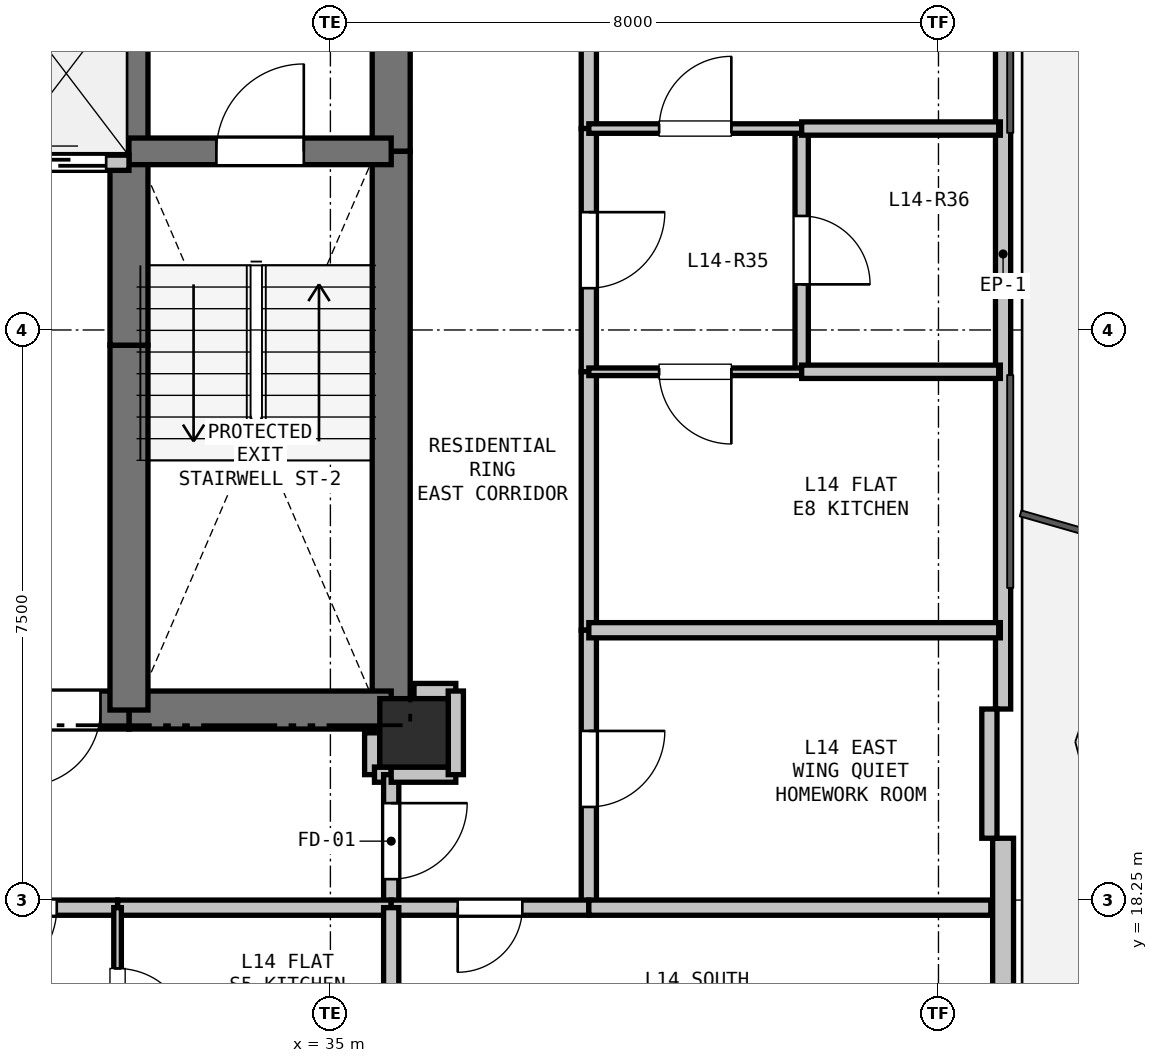
"""IFC4 building model, lengths in metres.
Left out: names, types, materials, properties, quantities, classifications, styles, units other than length and angle.
Written with IfcOpenShell. Run it as: python <this file> out.ifc"""

import sys

from ifc_helpers import new_model, si_unit, direction, frame, frame_2d, origin, origin_2d, place, context, subcontext, project, spatial, rectangle, extrude, element, fill, save


model = new_model("IFC4")
c1 = context("Model", 3, precision=1e-05, world=origin(), true_north=direction((0.0, 1.0)))
c2 = subcontext(c1, "Body", "Model", "MODEL_VIEW")
j1 = project(units=[si_unit("LENGTHUNIT", "METRE"), si_unit("PLANEANGLEUNIT", "RADIAN")], contexts=[c1])
p1 = place(None, origin())
s1 = spatial("IfcSite", under=j1, at=p1, CompositionType="ELEMENT")
p2 = place(p1, origin())
s2 = spatial("IfcBuilding", under=s1, at=p2, CompositionType="ELEMENT")
p3 = place(p2, frame((0.0, 0.0, 52.2)))
s3 = spatial("IfcBuildingStorey", under=s2, at=p3, CompositionType="ELEMENT", Elevation=52.2)
p4 = place(p3, frame((36.1, 20.45, 0.0), z_axis=(0.0, 0.0, 1.0), x_axis=(1.0, 0.0, 0.0)))
e1 = element("IfcColumn", 1, at=p4, inside=s3, PredefinedType="COLUMN", context=c2, shape_type="SweptSolid", body=[
    extrude(rectangle(XDim=0.9, YDim=0.9, at=origin_2d()), origin(), (0.0, 0.0, 1.0), 3.3),
])
p5 = place(p3, frame((43.85, 32.737, 0.0), z_axis=(0.0, 0.0, 1.0), x_axis=(0.0, -1.0, 0.0)))
e2 = element("IfcWall", 2, at=p5, inside=s3, PredefinedType="PARAPET", context=c2, shape_type="SweptSolid", body=[
    extrude(rectangle(XDim=11.973, YDim=0.2, at=frame_2d((5.987, 0.0))), origin(), (0.0, 0.0, 1.0), 0.2),
])
p6 = place(p3, frame((43.85, 19.063, 0.0), z_axis=(0.0, 0.0, 1.0), x_axis=(0.0, -1.0, 0.0)))
e3 = element("IfcWall", 3, at=p6, inside=s3, PredefinedType="SOLIDWALL", context=c2, shape_type="SweptSolid", body=[
    extrude(rectangle(XDim=12.673, YDim=0.275, at=frame_2d((6.336, 0.0))), origin(), (0.0, 0.0, 1.0), 2.66),
])
p7 = place(p3, frame((43.67, 20.763, 0.0), z_axis=(0.0, 0.0, 1.0), x_axis=(0.0, -1.0, 0.0)))
e4 = element("IfcWall", 4, at=p7, inside=s3, PredefinedType="PARAPET", context=c2, shape_type="SweptSolid", body=[
    extrude(rectangle(XDim=1.7, YDim=0.2, at=frame_2d((0.85, 0.0))), origin(), (0.0, 0.0, 1.0), 2.66),
])
p8 = place(p3, frame((35.8, 32.75, 0.0), z_axis=(0.0, 0.0, 1.0), x_axis=(0.0, -1.0, 0.0)))
e5 = element("IfcWall", 5, at=p8, inside=s3, PredefinedType="SHEAR", context=c2, shape_type="SweptSolid", body=[
    extrude(rectangle(XDim=4.65, YDim=0.5, at=frame_2d((2.325, 0.0))), origin(), (0.0, 0.0, 1.0), 3.04),
])
p9 = place(p3, frame((35.8, 28.1, 0.0), z_axis=(0.0, 0.0, 1.0), x_axis=(0.0, -1.0, 0.0)))
e6 = element("IfcWall", 6, at=p9, inside=s3, PredefinedType="SHEAR", context=c2, shape_type="SweptSolid", body=[
    extrude(rectangle(XDim=7.35, YDim=0.5, at=frame_2d((3.675, 0.0))), origin(), (0.0, 0.0, 1.0), 3.04),
])
p10 = place(p3, frame((35.8, 20.75, 0.0), z_axis=(0.0, 0.0, 1.0), x_axis=(-1.0, 0.0, 0.0)))
e7 = element("IfcWall", 7, at=p10, inside=s3, PredefinedType="SHEAR", context=c2, shape_type="SweptSolid", body=[
    extrude(rectangle(XDim=3.45, YDim=0.5, at=frame_2d((1.725, 0.0))), origin(), (0.0, 0.0, 1.0), 3.04),
])
p11 = place(p3, frame((32.35, 20.75, 0.0), z_axis=(0.0, 0.0, 1.0), x_axis=(-1.0, 0.0, 0.0)))
e8 = element("IfcWall", 8, at=p11, inside=s3, PredefinedType="SHEAR", context=c2, shape_type="SweptSolid", body=[
    extrude(rectangle(XDim=1.75, YDim=0.5, at=frame_2d((0.875, 0.0))), origin(), (0.0, 0.0, 1.0), 3.04),
])
p12 = place(p11, frame((0.375, 0.0, 0.0)))
e9 = element("IfcOpeningElement", 9, at=p12, cuts=e8, PredefinedType="OPENING", context=c2, shape_type="SweptSolid", body=[
    extrude(rectangle(XDim=1.0, YDim=2.15, at=frame_2d((0.5, 1.075))), frame((0.0, 0.26, 0.0), z_axis=(0.0, -1.0, 0.0), x_axis=(1.0, 0.0, 0.0)), (0.0, 0.0, 1.0), 0.52),
])
p13 = place(p3, frame((32.35, 20.75, 0.0), z_axis=(0.0, 0.0, 1.0), x_axis=(0.0, 1.0, 0.0)))
e10 = element("IfcWall", 10, at=p13, inside=s3, PredefinedType="SHEAR", context=c2, shape_type="SweptSolid", body=[
    extrude(rectangle(XDim=4.8, YDim=0.5, at=frame_2d((2.4, 0.0))), origin(), (0.0, 0.0, 1.0), 3.04),
])
p14 = place(p3, frame((32.35, 25.55, 0.0), z_axis=(0.0, 0.0, 1.0), x_axis=(0.0, 1.0, 0.0)))
e11 = element("IfcWall", 11, at=p14, inside=s3, PredefinedType="SHEAR", context=c2, shape_type="SweptSolid", body=[
    extrude(rectangle(XDim=2.4, YDim=0.5, at=frame_2d((1.2, 0.0))), origin(), (0.0, 0.0, 1.0), 3.04),
])
p15 = place(p3, frame((32.35, 27.95, 0.0), z_axis=(0.0, 0.0, 1.0), x_axis=(0.0, 1.0, 0.0)))
e12 = element("IfcWall", 12, at=p15, inside=s3, PredefinedType="SHEAR", context=c2, shape_type="SweptSolid", body=[
    extrude(rectangle(XDim=2.8, YDim=0.5, at=frame_2d((1.4, 0.0))), origin(), (0.0, 0.0, 1.0), 3.04),
])
p16 = place(p3, frame((32.35, 28.1, 0.0), z_axis=(0.0, 0.0, 1.0), x_axis=(1.0, 0.0, 0.0)))
e13 = element("IfcWall", 13, at=p16, inside=s3, PredefinedType="SHEAR", context=c2, shape_type="SweptSolid", body=[
    extrude(rectangle(XDim=3.45, YDim=0.35, at=frame_2d((1.725, 0.0))), origin(), (0.0, 0.0, 1.0), 3.04),
])
p17 = place(p16, frame((1.15, 0.0, 0.0)))
e14 = element("IfcOpeningElement", 14, at=p17, cuts=e13, PredefinedType="OPENING", context=c2, shape_type="SweptSolid", body=[
    extrude(rectangle(XDim=1.15, YDim=2.15, at=frame_2d((0.575, 1.075))), frame((0.0, 0.185, 0.0), z_axis=(0.0, -1.0, 0.0), x_axis=(1.0, 0.0, 0.0)), (0.0, 0.0, 1.0), 0.37),
])
p18 = place(p3, frame((27.4, 27.95, 0.0), z_axis=(0.0, 0.0, 1.0), x_axis=(1.0, 0.0, 0.0)))
e15 = element("IfcWall", 15, at=p18, inside=s3, PredefinedType="PARTITIONING", context=c2, shape_type="SweptSolid", body=[
    extrude(rectangle(XDim=4.95, YDim=0.2, at=frame_2d((2.475, 0.0))), origin(), (0.0, 0.0, 1.0), 3.04),
])
p19 = place(p18, frame((0.25, 0.0, 0.0)))
e16 = element("IfcOpeningElement", 16, at=p19, cuts=e15, PredefinedType="OPENING", context=c2, shape_type="SweptSolid", body=[
    extrude(rectangle(XDim=1.1, YDim=2.15, at=frame_2d((0.55, 1.075))), frame((0.0, 0.11, 0.0), z_axis=(0.0, -1.0, 0.0), x_axis=(1.0, 0.0, 0.0)), (0.0, 0.0, 1.0), 0.22),
])
p20 = place(p18, frame((1.9, 0.0, 0.0)))
e17 = element("IfcOpeningElement", 17, at=p20, cuts=e15, PredefinedType="OPENING", context=c2, shape_type="SweptSolid", body=[
    extrude(rectangle(XDim=1.1, YDim=2.15, at=frame_2d((0.55, 1.075))), frame((0.0, 0.11, 0.0), z_axis=(0.0, -1.0, 0.0), x_axis=(1.0, 0.0, 0.0)), (0.0, 0.0, 1.0), 0.22),
])
p21 = place(p18, frame((3.55, 0.0, 0.0)))
e18 = element("IfcOpeningElement", 18, at=p21, cuts=e15, PredefinedType="OPENING", context=c2, shape_type="SweptSolid", body=[
    extrude(rectangle(XDim=1.1, YDim=2.15, at=frame_2d((0.55, 1.075))), frame((0.0, 0.11, 0.0), z_axis=(0.0, -1.0, 0.0), x_axis=(1.0, 0.0, 0.0)), (0.0, 0.0, 1.0), 0.22),
])
p22 = place(p3, frame((35.55, 20.45, 0.0), z_axis=(0.0, 0.0, 1.0), x_axis=(0.0, -1.0, 0.0)))
e19 = element("IfcWall", 19, at=p22, inside=s3, PredefinedType="PARTITIONING", context=c2, shape_type="SweptSolid", body=[
    extrude(rectangle(XDim=0.55, YDim=0.2, at=frame_2d((0.275, 0.0))), origin(), (0.0, 0.0, 1.0), 2.488),
])
p23 = place(p3, frame((35.58, 19.9, 0.0), z_axis=(0.0, 0.0, 1.0), x_axis=(1.0, 0.0, 0.0)))
e20 = element("IfcWall", 20, at=p23, inside=s3, PredefinedType="PARTITIONING", context=c2, shape_type="SweptSolid", body=[
    extrude(rectangle(XDim=0.22, YDim=0.2, at=frame_2d((0.11, 0.0))), origin(), (0.0, 0.0, 1.0), 3.04),
])
p24 = place(p3, frame((35.8, 19.9, 0.0), z_axis=(0.0, 0.0, 1.0), x_axis=(0.0, -1.0, 0.0)))
e21 = element("IfcWall", 21, at=p24, inside=s3, PredefinedType="PARTITIONING", context=c2, shape_type="SweptSolid", body=[
    extrude(rectangle(XDim=1.75, YDim=0.2, at=frame_2d((0.875, 0.0))), origin(), (0.0, 0.0, 1.0), 3.04),
])
p25 = place(p24, frame((0.375, 0.0, 0.0)))
e22 = element("IfcOpeningElement", 22, at=p25, cuts=e21, PredefinedType="OPENING", context=c2, shape_type="SweptSolid", body=[
    extrude(rectangle(XDim=1.0, YDim=2.15, at=frame_2d((0.5, 1.075))), frame((0.0, 0.11, 0.0), z_axis=(0.0, -1.0, 0.0), x_axis=(1.0, 0.0, 0.0)), (0.0, 0.0, 1.0), 0.22),
])
p26 = place(p3, frame((35.8, 18.15, 0.0), z_axis=(0.0, 0.0, 1.0), x_axis=(-1.0, 0.0, 0.0)))
e23 = element("IfcWall", 23, at=p26, inside=s3, PredefinedType="PARTITIONING", context=c2, shape_type="SweptSolid", body=[
    extrude(rectangle(XDim=3.6, YDim=0.2, at=frame_2d((1.8, 0.0))), origin(), (0.0, 0.0, 1.0), 3.04),
])
p27 = place(p3, frame((32.2, 18.15, 0.0), z_axis=(0.0, 0.0, 1.0), x_axis=(-1.0, 0.0, 0.0)))
e24 = element("IfcWall", 24, at=p27, inside=s3, PredefinedType="PARTITIONING", context=c2, shape_type="SweptSolid", body=[
    extrude(rectangle(XDim=2.6, YDim=0.2, at=frame_2d((1.3, 0.0))), origin(), (0.0, 0.0, 1.0), 3.04),
])
p28 = place(p27, frame((0.8, 0.0, 0.0)))
e25 = element("IfcOpeningElement", 25, at=p28, cuts=e24, PredefinedType="OPENING", context=c2, shape_type="SweptSolid", body=[
    extrude(rectangle(XDim=1.0, YDim=2.15, at=frame_2d((0.5, 1.075))), frame((0.0, 0.11, 0.0), z_axis=(0.0, -1.0, 0.0), x_axis=(1.0, 0.0, 0.0)), (0.0, 0.0, 1.0), 0.22),
])
p29 = place(p3, frame((36.65, 21.0, 0.0), z_axis=(0.0, 0.0, 1.0), x_axis=(-1.0, 0.0, 0.0)))
e26 = element("IfcWall", 26, at=p29, inside=s3, PredefinedType="PARTITIONING", context=c2, shape_type="SweptSolid", body=[
    extrude(rectangle(XDim=0.55, YDim=0.2, at=frame_2d((0.275, 0.0))), origin(), (0.0, 0.0, 1.0), 2.488),
])
p30 = place(p3, frame((38.4, 35.35, 0.0), z_axis=(0.0, 0.0, 1.0), x_axis=(0.0, -1.0, 0.0)))
e27 = element("IfcWall", 27, at=p30, inside=s3, PredefinedType="PARTITIONING", context=c2, shape_type="SweptSolid", body=[
    extrude(rectangle(XDim=6.95, YDim=0.2, at=frame_2d((3.475, 0.0))), origin(), (0.0, 0.0, 1.0), 2.338),
])
p31 = place(p3, frame((38.4, 28.4, 0.0), z_axis=(0.0, 0.0, 1.0), x_axis=(0.0, -1.0, 0.0)))
e28 = element("IfcWall", 28, at=p31, inside=s3, PredefinedType="PARTITIONING", context=c2, shape_type="SweptSolid", body=[
    extrude(rectangle(XDim=3.2, YDim=0.2, at=frame_2d((1.6, 0.0))), origin(), (0.0, 0.0, 1.0), 3.04),
])
p32 = place(p31, frame((1.1, 0.0, 0.0)))
e29 = element("IfcOpeningElement", 29, at=p32, cuts=e28, PredefinedType="OPENING", context=c2, shape_type="SweptSolid", body=[
    extrude(rectangle(XDim=1.0, YDim=2.15, at=frame_2d((0.5, 1.075))), frame((0.0, 0.11, 0.0), z_axis=(0.0, -1.0, 0.0), x_axis=(1.0, 0.0, 0.0)), (0.0, 0.0, 1.0), 0.22),
])
p33 = place(p3, frame((38.4, 25.2, 0.0), z_axis=(0.0, 0.0, 1.0), x_axis=(0.0, -1.0, 0.0)))
e30 = element("IfcWall", 30, at=p33, inside=s3, PredefinedType="PARTITIONING", context=c2, shape_type="SweptSolid", body=[
    extrude(rectangle(XDim=3.4, YDim=0.2, at=frame_2d((1.7, 0.0))), origin(), (0.0, 0.0, 1.0), 3.04),
])
p34 = place(p3, frame((38.4, 21.8, 0.0), z_axis=(0.0, 0.0, 1.0), x_axis=(0.0, -1.0, 0.0)))
e31 = element("IfcWall", 31, at=p34, inside=s3, PredefinedType="PARTITIONING", context=c2, shape_type="SweptSolid", body=[
    extrude(rectangle(XDim=3.65, YDim=0.2, at=frame_2d((1.825, 0.0))), origin(), (0.0, 0.0, 1.0), 3.04),
])
p35 = place(p34, frame((1.325, 0.0, 0.0)))
e32 = element("IfcOpeningElement", 32, at=p35, cuts=e31, PredefinedType="OPENING", context=c2, shape_type="SweptSolid", body=[
    extrude(rectangle(XDim=1.0, YDim=2.15, at=frame_2d((0.5, 1.075))), frame((0.0, 0.11, 0.0), z_axis=(0.0, -1.0, 0.0), x_axis=(1.0, 0.0, 0.0)), (0.0, 0.0, 1.0), 0.22),
])
p36 = place(p3, frame((38.4, 18.15, 0.0), z_axis=(0.0, 0.0, 1.0), x_axis=(-1.0, 0.0, 0.0)))
e33 = element("IfcWall", 33, at=p36, inside=s3, PredefinedType="PARTITIONING", context=c2, shape_type="SweptSolid", body=[
    extrude(rectangle(XDim=2.6, YDim=0.2, at=frame_2d((1.3, 0.0))), origin(), (0.0, 0.0, 1.0), 2.338),
])
p37 = place(p36, frame((0.875, 0.0, 0.0)))
e34 = element("IfcOpeningElement", 34, at=p37, cuts=e33, PredefinedType="OPENING", context=c2, shape_type="SweptSolid", body=[
    extrude(rectangle(XDim=0.85, YDim=2.1, at=frame_2d((0.425, 1.05))), frame((0.0, 0.11, 0.0), z_axis=(0.0, -1.0, 0.0), x_axis=(1.0, 0.0, 0.0)), (0.0, 0.0, 1.0), 0.22),
])
p38 = place(p3, frame((35.8, 19.9, 0.0), z_axis=(0.0, 0.0, 1.0), x_axis=(1.0, 0.0, 0.0)))
e35 = element("IfcWall", 35, at=p38, inside=s3, PredefinedType="PARTITIONING", context=c2, shape_type="SweptSolid", body=[
    extrude(rectangle(XDim=0.85, YDim=0.2, at=frame_2d((0.425, 0.0))), origin(), (0.0, 0.0, 1.0), 2.338),
])
p39 = place(p3, frame((36.65, 19.9, 0.0), z_axis=(0.0, 0.0, 1.0), x_axis=(0.0, 1.0, 0.0)))
e36 = element("IfcWall", 36, at=p39, inside=s3, PredefinedType="PARTITIONING", context=c2, shape_type="SweptSolid", body=[
    extrude(rectangle(XDim=1.1, YDim=0.2, at=frame_2d((0.55, 0.0))), origin(), (0.0, 0.0, 1.0), 3.04),
])
p40 = place(p3, frame((32.2, 18.15, 0.0), z_axis=(0.0, 0.0, 1.0), x_axis=(0.0, -1.0, 0.0)))
e37 = element("IfcWall", 37, at=p40, inside=s3, PredefinedType="PARTITIONING", context=c2, shape_type="SweptSolid", body=[
    extrude(rectangle(XDim=2.55, YDim=0.1, at=frame_2d((1.275, 0.0))), origin(), (0.0, 0.0, 1.0), 3.04),
])
p41 = place(p40, frame((0.8, 0.0, 0.0)))
e38 = element("IfcOpeningElement", 38, at=p41, cuts=e37, PredefinedType="OPENING", context=c2, shape_type="SweptSolid", body=[
    extrude(rectangle(XDim=0.95, YDim=2.1, at=frame_2d((0.475, 1.05))), frame((0.0, 0.06, 0.0), z_axis=(0.0, -1.0, 0.0), x_axis=(1.0, 0.0, 0.0)), (0.0, 0.0, 1.0), 0.12),
])
p42 = place(p3, frame((41.2, 28.4, 0.0), z_axis=(0.0, 0.0, 1.0), x_axis=(0.0, -1.0, 0.0)))
e39 = element("IfcWall", 39, at=p42, inside=s3, PredefinedType="PLUMBINGWALL", context=c2, shape_type="SweptSolid", body=[
    extrude(rectangle(XDim=3.2, YDim=0.175, at=frame_2d((1.6, 0.0))), origin(), (0.0, 0.0, 1.0), 3.04),
])
p43 = place(p42, frame((1.15, 0.0, 0.0)))
e40 = element("IfcOpeningElement", 40, at=p43, cuts=e39, PredefinedType="OPENING", context=c2, shape_type="SweptSolid", body=[
    extrude(rectangle(XDim=0.9, YDim=2.1, at=frame_2d((0.45, 1.05))), frame((0.0, 0.097, 0.0), z_axis=(0.0, -1.0, 0.0), x_axis=(1.0, 0.0, 0.0)), (0.0, 0.0, 1.0), 0.195),
])
p44 = place(p3, frame((41.2, 25.2, 0.0), z_axis=(0.0, 0.0, 1.0), x_axis=(-1.0, 0.0, 0.0)))
e41 = element("IfcWall", 41, at=p44, inside=s3, PredefinedType="PARTITIONING", context=c2, shape_type="SweptSolid", body=[
    extrude(rectangle(XDim=2.8, YDim=0.1, at=frame_2d((1.4, 0.0))), origin(), (0.0, 0.0, 1.0), 3.04),
])
p45 = place(p44, frame((0.925, 0.0, 0.0)))
e42 = element("IfcOpeningElement", 42, at=p45, cuts=e41, PredefinedType="OPENING", context=c2, shape_type="SweptSolid", body=[
    extrude(rectangle(XDim=0.95, YDim=2.1, at=frame_2d((0.475, 1.05))), frame((0.0, 0.06, 0.0), z_axis=(0.0, -1.0, 0.0), x_axis=(1.0, 0.0, 0.0)), (0.0, 0.0, 1.0), 0.12),
])
p46 = place(p3, frame((38.4, 28.4, 0.0), z_axis=(0.0, 0.0, 1.0), x_axis=(1.0, 0.0, 0.0)))
e43 = element("IfcWall", 43, at=p46, inside=s3, PredefinedType="PARTITIONING", context=c2, shape_type="SweptSolid", body=[
    extrude(rectangle(XDim=2.8, YDim=0.125, at=frame_2d((1.4, 0.0))), origin(), (0.0, 0.0, 1.0), 3.04),
])
p47 = place(p46, frame((0.925, 0.0, 0.0)))
e44 = element("IfcOpeningElement", 44, at=p47, cuts=e43, PredefinedType="OPENING", context=c2, shape_type="SweptSolid", body=[
    extrude(rectangle(XDim=0.95, YDim=2.1, at=frame_2d((0.475, 1.05))), frame((0.0, 0.073, 0.0), z_axis=(0.0, -1.0, 0.0), x_axis=(1.0, 0.0, 0.0)), (0.0, 0.0, 1.0), 0.145),
])
p48 = place(p3, frame((35.8, 18.15, 0.0), z_axis=(0.0, 0.0, 1.0), x_axis=(0.0, -1.0, 0.0)))
e45 = element("IfcWall", 45, at=p48, inside=s3, PredefinedType="PARTITIONING", context=c2, shape_type="SweptSolid", body=[
    extrude(rectangle(XDim=2.55, YDim=0.2, at=frame_2d((1.275, 0.0))), origin(), (0.0, 0.0, 1.0), 3.04),
])
for number, where, z_axis, x_axis in (
    (46, (41.2, 28.4, 0.0), (0.0, 0.0, 1.0), (1.0, 0.0, 0.0)),
    (47, (43.814, 25.2, 0.0), (0.0, 0.0, 1.0), (-1.0, 0.0, 0.0)),
):
    element("IfcWall", number, at=place(p3, frame(where, z_axis=z_axis, x_axis=x_axis)), inside=s3, PredefinedType="PLUMBINGWALL", context=c2, shape_type="SweptSolid", body=[
        extrude(rectangle(XDim=2.614, YDim=0.175, at=frame_2d((1.307, 0.0))), origin(), (0.0, 0.0, 1.0), 2.365),
    ])
p49 = place(p3, frame((43.814, 21.8, 0.0), z_axis=(0.0, 0.0, 1.0), x_axis=(-1.0, 0.0, 0.0)))
e48 = element("IfcWall", 48, at=p49, inside=s3, PredefinedType="PARTITIONING", context=c2, shape_type="SweptSolid", body=[
    extrude(rectangle(XDim=5.414, YDim=0.2, at=frame_2d((2.707, 0.0))), origin(), (0.0, 0.0, 1.0), 2.365),
])
p50 = place(p3, frame((38.4, 18.15, 0.0), z_axis=(0.0, 0.0, 1.0), x_axis=(1.0, 0.0, 0.0)))
e49 = element("IfcWall", 49, at=p50, inside=s3, PredefinedType="PARTITIONING", context=c2, shape_type="SweptSolid", body=[
    extrude(rectangle(XDim=5.289, YDim=0.2, at=frame_2d((2.644, 0.0))), origin(), (0.0, 0.0, 1.0), 2.365),
])
p51 = place(p21, origin())
e50 = element("IfcDoor", 50, at=p51, inside=s3, OperationType="SLIDING_TO_LEFT", PredefinedType="DOOR", context=c2, shape_type="SweptSolid", body=[
    extrude(rectangle(XDim=1.1, YDim=2.15, at=frame_2d((0.55, 1.075))), frame((0.0, 0.025, 0.0), z_axis=(0.0, -1.0, 0.0), x_axis=(1.0, 0.0, 0.0)), (0.0, 0.0, 1.0), 0.05),
])
fill(e18, e50)
p52 = place(p12, origin())
e51 = element("IfcDoor", 51, at=p52, inside=s3, OperationType="SINGLE_SWING_RIGHT", PredefinedType="DOOR", context=c2, shape_type="SweptSolid", body=[
    extrude(rectangle(XDim=1.0, YDim=2.15, at=frame_2d((0.5, 1.075))), frame((0.0, 0.025, 0.0), z_axis=(0.0, -1.0, 0.0), x_axis=(1.0, 0.0, 0.0)), (0.0, 0.0, 1.0), 0.05),
])
fill(e9, e51)
p53 = place(p17, origin())
e52 = element("IfcDoor", 52, at=p53, inside=s3, OperationType="SINGLE_SWING_RIGHT", PredefinedType="DOOR", context=c2, shape_type="SweptSolid", body=[
    extrude(rectangle(XDim=1.15, YDim=2.15, at=frame_2d((0.575, 1.075))), frame((0.0, 0.025, 0.0), z_axis=(0.0, -1.0, 0.0), x_axis=(1.0, 0.0, 0.0)), (0.0, 0.0, 1.0), 0.05),
])
fill(e14, e52)
p54 = place(p25, origin())
e53 = element("IfcDoor", 53, at=p54, inside=s3, OperationType="SINGLE_SWING_LEFT", PredefinedType="DOOR", context=c2, shape_type="SweptSolid", body=[
    extrude(rectangle(XDim=1.0, YDim=2.15, at=frame_2d((0.5, 1.075))), frame((0.0, 0.025, 0.0), z_axis=(0.0, -1.0, 0.0), x_axis=(1.0, 0.0, 0.0)), (0.0, 0.0, 1.0), 0.05),
])
fill(e22, e53)
p55 = place(p28, origin())
e54 = element("IfcDoor", 54, at=p55, inside=s3, OperationType="SINGLE_SWING_RIGHT", PredefinedType="DOOR", context=c2, shape_type="SweptSolid", body=[
    extrude(rectangle(XDim=1.0, YDim=2.15, at=frame_2d((0.5, 1.075))), frame((0.0, 0.025, 0.0), z_axis=(0.0, -1.0, 0.0), x_axis=(1.0, 0.0, 0.0)), (0.0, 0.0, 1.0), 0.05),
])
fill(e25, e54)
p56 = place(p32, origin())
e55 = element("IfcDoor", 55, at=p56, inside=s3, OperationType="SINGLE_SWING_LEFT", PredefinedType="DOOR", context=c2, shape_type="SweptSolid", body=[
    extrude(rectangle(XDim=1.0, YDim=2.15, at=frame_2d((0.5, 1.075))), frame((0.0, 0.025, 0.0), z_axis=(0.0, -1.0, 0.0), x_axis=(1.0, 0.0, 0.0)), (0.0, 0.0, 1.0), 0.05),
])
fill(e29, e55)
p57 = place(p37, origin())
e56 = element("IfcDoor", 56, at=p57, inside=s3, OperationType="SINGLE_SWING_RIGHT", PredefinedType="DOOR", context=c2, shape_type="SweptSolid", body=[
    extrude(rectangle(XDim=0.85, YDim=2.1, at=frame_2d((0.425, 1.05))), frame((0.0, 0.025, 0.0), z_axis=(0.0, -1.0, 0.0), x_axis=(1.0, 0.0, 0.0)), (0.0, 0.0, 1.0), 0.05),
])
fill(e34, e56)
p58 = place(p35, origin())
e57 = element("IfcDoor", 57, at=p58, inside=s3, OperationType="SINGLE_SWING_LEFT", PredefinedType="DOOR", context=c2, shape_type="SweptSolid", body=[
    extrude(rectangle(XDim=1.0, YDim=2.15, at=frame_2d((0.5, 1.075))), frame((0.0, 0.025, 0.0), z_axis=(0.0, -1.0, 0.0), x_axis=(1.0, 0.0, 0.0)), (0.0, 0.0, 1.0), 0.05),
])
fill(e32, e57)
p59 = place(p41, origin())
e58 = element("IfcDoor", 58, at=p59, inside=s3, OperationType="SINGLE_SWING_RIGHT", PredefinedType="DOOR", context=c2, shape_type="SweptSolid", body=[
    extrude(rectangle(XDim=0.95, YDim=2.1, at=frame_2d((0.475, 1.05))), frame((0.0, 0.025, 0.0), z_axis=(0.0, -1.0, 0.0), x_axis=(1.0, 0.0, 0.0)), (0.0, 0.0, 1.0), 0.05),
])
fill(e38, e58)
p60 = place(p43, origin())
e59 = element("IfcDoor", 59, at=p60, inside=s3, OperationType="SINGLE_SWING_RIGHT", PredefinedType="DOOR", context=c2, shape_type="SweptSolid", body=[
    extrude(rectangle(XDim=0.9, YDim=2.1, at=frame_2d((0.45, 1.05))), frame((0.0, 0.025, 0.0), z_axis=(0.0, -1.0, 0.0), x_axis=(1.0, 0.0, 0.0)), (0.0, 0.0, 1.0), 0.05),
])
fill(e40, e59)
p61 = place(p45, origin())
e60 = element("IfcDoor", 60, at=p61, inside=s3, OperationType="SINGLE_SWING_LEFT", PredefinedType="DOOR", context=c2, shape_type="SweptSolid", body=[
    extrude(rectangle(XDim=0.95, YDim=2.1, at=frame_2d((0.475, 1.05))), frame((0.0, 0.025, 0.0), z_axis=(0.0, -1.0, 0.0), x_axis=(1.0, 0.0, 0.0)), (0.0, 0.0, 1.0), 0.05),
])
fill(e42, e60)
p62 = place(p47, origin())
e61 = element("IfcDoor", 61, at=p62, inside=s3, OperationType="SINGLE_SWING_RIGHT", PredefinedType="DOOR", context=c2, shape_type="SweptSolid", body=[
    extrude(rectangle(XDim=0.95, YDim=2.1, at=frame_2d((0.475, 1.05))), frame((0.0, 0.025, 0.0), z_axis=(0.0, -1.0, 0.0), x_axis=(1.0, 0.0, 0.0)), (0.0, 0.0, 1.0), 0.05),
])
fill(e44, e61)
save(model, sys.argv[1])
